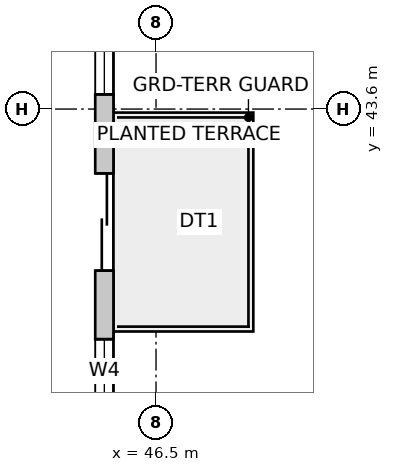
"""IFC4 building model, lengths in metres.
Left out: names, types, materials, properties, quantities, classifications, styles, units other than length and angle.
Written with IfcOpenShell. Run it as: python <this file> out.ifc"""

import sys

from ifc_helpers import new_model, si_unit, direction, frame, frame_2d, origin, place, context, subcontext, project, spatial, rectangle, extrude, source, transform, mapped, element, fill, save


model = new_model("IFC4")
c1 = context("Model", 3, precision=1e-05, world=origin(), true_north=direction((0.0, 1.0)))
c2 = subcontext(c1, "Body", "Model", "MODEL_VIEW")
j1 = project(units=[si_unit("LENGTHUNIT", "METRE"), si_unit("PLANEANGLEUNIT", "RADIAN")], contexts=[c1])
p1 = place(None, origin())
s1 = spatial("IfcSite", under=j1, at=p1, CompositionType="ELEMENT")
p2 = place(p1, origin())
s2 = spatial("IfcBuilding", under=s1, at=p2, CompositionType="ELEMENT")
p3 = place(p2, frame((0.0, 0.0, 218.4)))
s3 = spatial("IfcBuildingStorey", under=s2, at=p3, CompositionType="ELEMENT", Elevation=218.4)
p4 = place(p3, frame((45.65, 36.549, 0.0), z_axis=(0.0, 0.0, 1.0), x_axis=(0.0, 1.0, 0.0)))
e1 = element("IfcWall", 1, at=p4, inside=s3, PredefinedType="SOLIDWALL", context=c2, shape_type="SweptSolid", body=[
    extrude(rectangle(XDim=10.73, YDim=0.3, at=frame_2d((5.365, 0.0))), origin(), (0.0, 0.0, 1.0), 3.25),
])
m1 = source(origin(), c2, "Body", "SweptSolid", [
    extrude(rectangle(XDim=1.6, YDim=2.15, at=frame_2d((0.8, 1.075))), frame((0.0, 0.16, 0.0), z_axis=(0.0, -1.0, 0.0), x_axis=(1.0, 0.0, 0.0)), (0.0, 0.0, 1.0), 0.32),
])
p5 = place(p4, frame((4.393, 0.0, 0.0)))
e2 = element("IfcOpeningElement", 2, at=p5, cuts=e1, PredefinedType="OPENING", context=c2, shape_type="MappedRepresentation", body=[
    mapped(m1, transform((0.0, 0.0, 0.0), scale=1.0)),
])
m2 = source(origin(), c2, "Body", "SweptSolid", [
    extrude(rectangle(XDim=2.1, YDim=2.0, at=frame_2d((1.05, 1.0))), frame((0.0, 0.16, 0.0), z_axis=(0.0, -1.0, 0.0), x_axis=(1.0, 0.0, 0.0)), (0.0, 0.0, 1.0), 0.32),
])
p6 = place(p4, frame((1.166, 0.0, 0.85)))
e3 = element("IfcOpeningElement", 3, at=p6, cuts=e1, PredefinedType="OPENING", context=c2, shape_type="MappedRepresentation", body=[
    mapped(m2, transform((0.0, 0.0, 0.0), scale=1.0)),
])
p7 = place(p4, frame((7.292, 0.0, 0.85)))
e4 = element("IfcOpeningElement", 4, at=p7, cuts=e1, PredefinedType="OPENING", context=c2, shape_type="MappedRepresentation", body=[
    mapped(m2, transform((0.0, 0.0, 0.0), scale=1.0)),
])
m3 = source(origin(), c2, "Body", "SweptSolid", [
    extrude(rectangle(XDim=1.6, YDim=2.15, at=frame_2d((0.8, 1.075))), frame((0.0, 0.025, 0.0), z_axis=(0.0, -1.0, 0.0), x_axis=(1.0, 0.0, 0.0)), (0.0, 0.0, 1.0), 0.05),
])
p8 = place(p5, origin())
e5 = element("IfcDoor", 5, at=p8, inside=s3, OperationType="DOUBLE_DOOR_SLIDING", PredefinedType="DOOR", context=c2, shape_type="MappedRepresentation", body=[
    mapped(m3, transform((0.0, 0.0, 0.0), scale=1.0)),
])
fill(e2, e5)
m4 = source(origin(), c2, "Body", "SweptSolid", [
    extrude(rectangle(XDim=2.1, YDim=2.0, at=frame_2d((1.05, 1.0))), frame((0.0, -0.015, 0.0), z_axis=(0.0, -1.0, 0.0), x_axis=(1.0, 0.0, 0.0)), (0.0, 0.0, 1.0), 0.06),
])
p9 = place(p6, origin())
e6 = element("IfcWindow", 6, at=p9, inside=s3, PartitioningType="SINGLE_PANEL", PredefinedType="WINDOW", context=c2, shape_type="MappedRepresentation", body=[
    mapped(m4, transform((0.0, 0.0, 0.0), scale=1.0)),
])
fill(e3, e6)
p10 = place(p7, origin())
e7 = element("IfcWindow", 7, at=p10, inside=s3, PartitioningType="SINGLE_PANEL", PredefinedType="WINDOW", context=c2, shape_type="MappedRepresentation", body=[
    mapped(m4, transform((0.0, 0.0, 0.0), scale=1.0)),
])
fill(e4, e7)
save(model, sys.argv[1])
